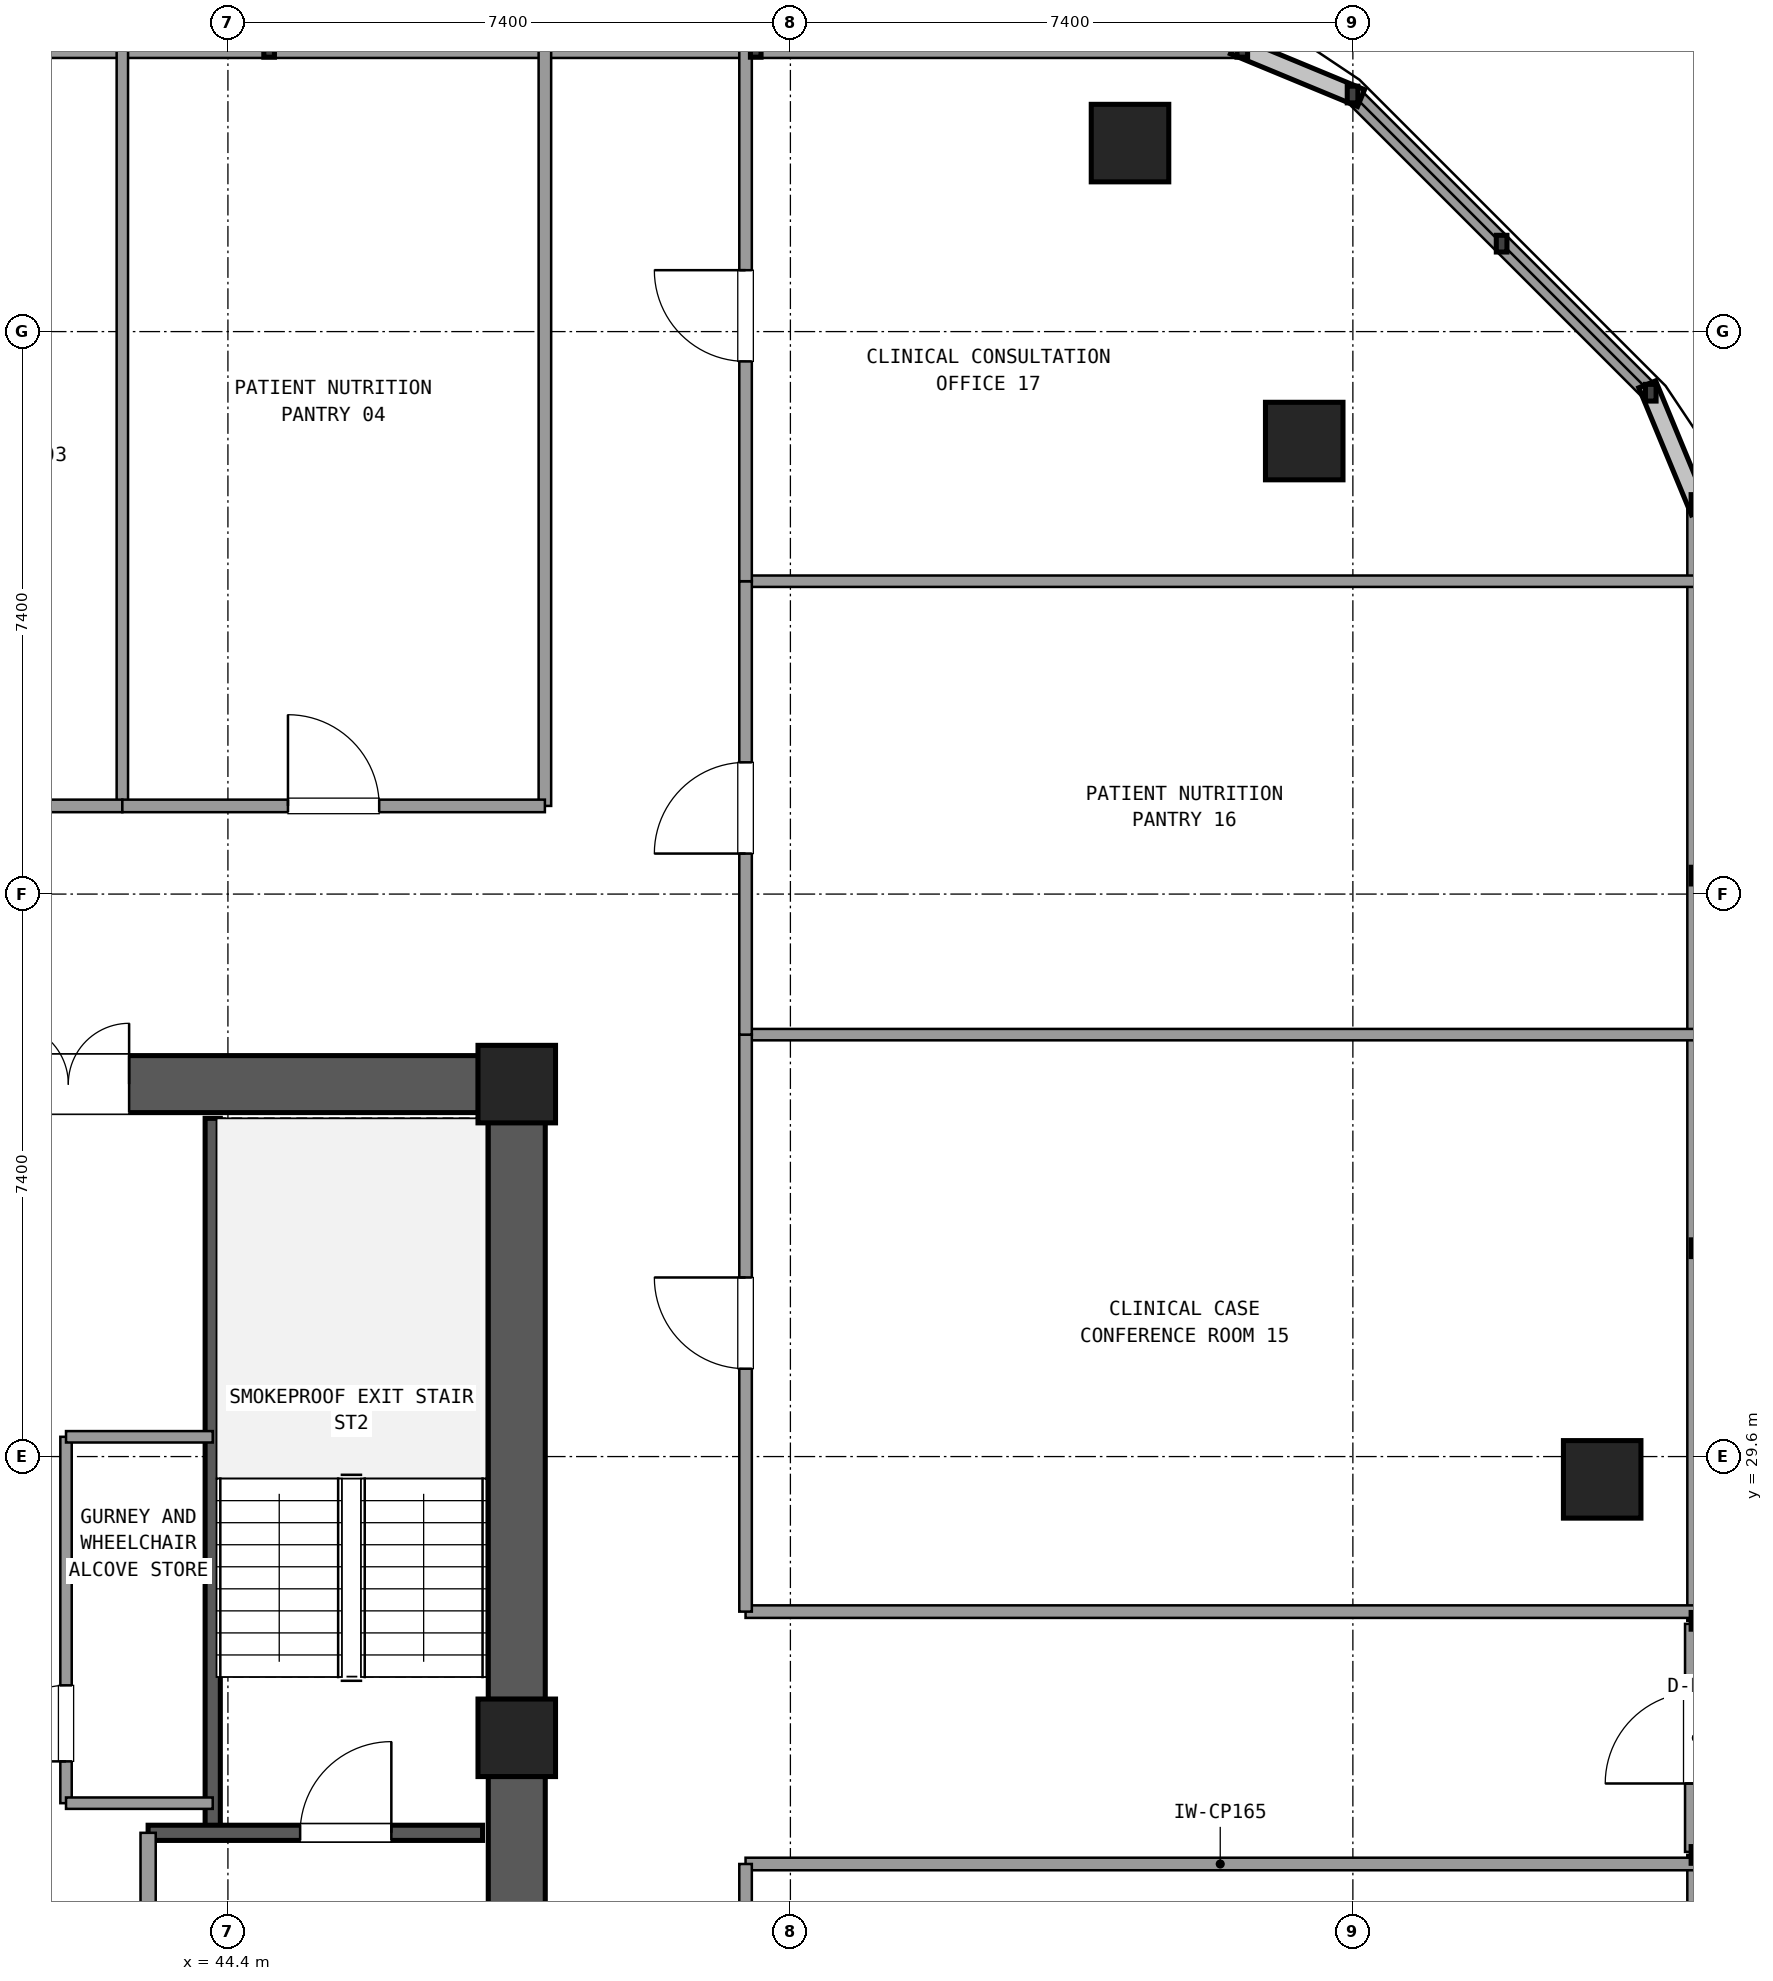
"""IFC4 building model, lengths in metres.
Left out: names, types, materials, properties, quantities, classifications, styles, units other than length and angle.
Written with IfcOpenShell. Run it as: python <this file> out.ifc"""

import sys

from ifc_helpers import new_model, si_unit, direction, frame, frame_2d, origin, origin_2d, place, context, subcontext, project, spatial, rectangle, extrude, element, fill, save


model = new_model("IFC4")
c1 = context("Model", 3, precision=1e-05, world=origin(), true_north=direction((0.0, 1.0)))
c2 = subcontext(c1, "Body", "Model", "MODEL_VIEW")
j1 = project(units=[si_unit("LENGTHUNIT", "METRE"), si_unit("PLANEANGLEUNIT", "RADIAN")], contexts=[c1])
p1 = place(None, origin())
s1 = spatial("IfcSite", under=j1, at=p1, CompositionType="ELEMENT")
p2 = place(p1, origin())
s2 = spatial("IfcBuilding", under=s1, at=p2, CompositionType="ELEMENT")
p3 = place(p2, frame((0.0, 0.0, 81.18)))
s3 = spatial("IfcBuildingStorey", under=s2, at=p3, CompositionType="ELEMENT", Elevation=81.18)
for number, where, z_axis, x_axis in (
    (1, (48.2, 25.9, 0.0), (0.0, 0.0, 1.0), (1.0, 0.0, 0.0)),
    (2, (48.2, 34.5, 0.0), (0.0, 0.0, 1.0), (1.0, 0.0, 0.0)),
):
    element("IfcColumn", number, at=place(p3, frame(where, z_axis=z_axis, x_axis=x_axis)), inside=s3, PredefinedType="COLUMN", context=c2, shape_type="SweptSolid", body=[
        extrude(rectangle(XDim=1.02, YDim=1.02, at=origin_2d()), origin(), (0.0, 0.0, 1.0), 3.6),
    ])
p4 = place(p3, frame((48.2, 17.805, 0.0), z_axis=(0.0, 0.0, 1.0), x_axis=(0.0, 1.0, 0.0)))
e3 = element("IfcWall", 3, at=p4, inside=s3, PredefinedType="SHEAR", context=c2, shape_type="SweptSolid", body=[
    extrude(rectangle(XDim=7.59, YDim=0.75, at=frame_2d((3.795, 0.0))), origin(), (0.0, 0.0, 1.0), 3.32),
])
p5 = place(p4, frame((4.245, 0.0, 0.0)))
e4 = element("IfcOpeningElement", 4, at=p5, cuts=e3, PredefinedType="OPENING", context=c2, shape_type="SweptSolid", body=[
    extrude(rectangle(XDim=1.2, YDim=2.15, at=frame_2d((0.6, 1.075))), frame((0.0, 0.385, 0.0), z_axis=(0.0, -1.0, 0.0), x_axis=(1.0, 0.0, 0.0)), (0.0, 0.0, 1.0), 0.77),
])
p6 = place(p3, frame((48.2, 26.405, 0.0), z_axis=(0.0, 0.0, 1.0), x_axis=(0.0, 1.0, 0.0)))
e5 = element("IfcWall", 5, at=p6, inside=s3, PredefinedType="SHEAR", context=c2, shape_type="SweptSolid", body=[
    extrude(rectangle(XDim=7.59, YDim=0.75, at=frame_2d((3.795, 0.0))), origin(), (0.0, 0.0, 1.0), 3.32),
])
p7 = place(p3, frame((47.695, 34.5, 0.0), z_axis=(0.0, 0.0, 1.0), x_axis=(-1.0, 0.0, 0.0)))
e6 = element("IfcWall", 6, at=p7, inside=s3, PredefinedType="SHEAR", context=c2, shape_type="SweptSolid", body=[
    extrude(rectangle(XDim=10.19, YDim=0.75, at=frame_2d((5.095, 0.0))), origin(), (0.0, 0.0, 1.0), 3.32),
])
p8 = place(p7, frame((4.595, 0.0, 0.0)))
e7 = element("IfcOpeningElement", 7, at=p8, cuts=e6, PredefinedType="OPENING", context=c2, shape_type="SweptSolid", body=[
    extrude(rectangle(XDim=1.6, YDim=2.2, at=frame_2d((0.8, 1.1))), frame((0.0, 0.385, 0.0), z_axis=(0.0, -1.0, 0.0), x_axis=(1.0, 0.0, 0.0)), (0.0, 0.0, 1.0), 0.77),
])
for number, where, z_axis, x_axis in (
    (8, (62.48, 29.3, 0.0), (0.0, 0.0, 1.0), (1.0, 0.0, 0.0)),
    (9, (58.56, 42.96, 0.0), (0.0, 0.0, 1.0), (1.0, 0.0, 0.0)),
    (10, (56.268, 46.88, 0.0), (0.0, 0.0, 1.0), (1.0, 0.0, 0.0)),
):
    element("IfcColumn", number, at=place(p3, frame(where, z_axis=z_axis, x_axis=x_axis)), inside=s3, PredefinedType="COLUMN", context=c2, shape_type="SweptSolid", body=[
        extrude(rectangle(XDim=1.02, YDim=1.02, at=origin_2d()), origin(), (0.0, 0.0, 1.0), 3.6),
    ])
p9 = place(p3, frame((63.72, 24.399, 0.0), z_axis=(0.0, 0.0, 1.0), x_axis=(0.0, 1.0, 0.0)))
e11 = element("IfcWall", 11, at=p9, inside=s3, PredefinedType="SOLIDWALL", context=c2, shape_type="SweptSolid", body=[
    extrude(rectangle(XDim=3.0, YDim=0.3, at=frame_2d((1.5, 0.0))), origin(), (0.0, 0.0, 1.0), 2.67),
])
p10 = place(p9, frame((0.9, 0.0, 0.0)))
e12 = element("IfcOpeningElement", 12, at=p10, cuts=e11, PredefinedType="OPENING", context=c2, shape_type="SweptSolid", body=[
    extrude(rectangle(XDim=1.2, YDim=2.2, at=frame_2d((0.6, 1.1))), frame((0.0, 0.16, 0.0), z_axis=(0.0, -1.0, 0.0), x_axis=(1.0, 0.0, 0.0)), (0.0, 0.0, 1.0), 0.32),
])
p11 = place(p3, frame((63.72, 9.655, 0.0), z_axis=(0.0, 0.0, 1.0), x_axis=(0.0, 1.0, 0.0)))
e13 = element("IfcWall", 13, at=p11, inside=s3, PredefinedType="SOLIDWALL", context=c2, shape_type="SweptSolid", body=[
    extrude(rectangle(XDim=14.704, YDim=0.24, at=frame_2d((7.352, 0.0))), origin(), (0.0, 0.0, 1.0), 0.85),
])
p12 = place(p3, frame((63.72, 27.439, 0.0), z_axis=(0.0, 0.0, 1.0), x_axis=(0.0, 1.0, 0.0)))
e14 = element("IfcWall", 14, at=p12, inside=s3, PredefinedType="SOLIDWALL", context=c2, shape_type="SweptSolid", body=[
    extrude(rectangle(XDim=14.706, YDim=0.24, at=frame_2d((7.353, 0.0))), origin(), (0.0, 0.0, 1.0), 0.85),
])
p13 = place(p3, frame((63.119, 43.596, 0.0), z_axis=(0.0, 0.0, 1.0), x_axis=(-0.707084777957, 0.707128783731, 0.0)))
e15 = element("IfcWall", 15, at=p13, inside=s3, PredefinedType="SOLIDWALL", context=c2, shape_type="SweptSolid", body=[
    extrude(rectangle(XDim=5.548, YDim=0.24, at=frame_2d((2.774, 0.0))), origin(), (0.0, 0.0, 1.0), 0.85),
])
p14 = place(p3, frame((57.745, 48.12, 0.0), z_axis=(0.0, 0.0, 1.0), x_axis=(-1.0, 0.0, 0.0)))
e16 = element("IfcWall", 16, at=p14, inside=s3, PredefinedType="SOLIDWALL", context=c2, shape_type="SweptSolid", body=[
    extrude(rectangle(XDim=19.204, YDim=0.24, at=frame_2d((9.602, 0.0))), origin(), (0.0, 0.0, 1.0), 0.85),
])
p15 = place(p3, frame((44.2, 24.65, 0.0), z_axis=(0.0, 0.0, 1.0), x_axis=(0.0, 1.0, 0.0)))
e17 = element("IfcWall", 17, at=p15, inside=s3, PredefinedType="SHEAR", context=c2, shape_type="SweptSolid", body=[
    extrude(rectangle(XDim=9.4, YDim=0.2, at=frame_2d((4.7, 0.0))), origin(), (0.0, 0.0, 1.0), 3.32),
])
p16 = place(p3, frame((43.35, 24.65, 0.0), z_axis=(0.0, 0.0, 1.0), x_axis=(1.0, 0.0, 0.0)))
e18 = element("IfcWall", 18, at=p16, inside=s3, PredefinedType="SHEAR", context=c2, shape_type="SweptSolid", body=[
    extrude(rectangle(XDim=4.4, YDim=0.2, at=frame_2d((2.2, 0.0))), origin(), (0.0, 0.0, 1.0), 3.32),
])
p17 = place(p16, frame((2.0, 0.0, 0.0)))
e19 = element("IfcOpeningElement", 19, at=p17, cuts=e18, PredefinedType="OPENING", context=c2, shape_type="SweptSolid", body=[
    extrude(rectangle(XDim=1.2, YDim=2.15, at=frame_2d((0.6, 1.075))), frame((0.0, 0.11, 0.0), z_axis=(0.0, -1.0, 0.0), x_axis=(1.0, 0.0, 0.0)), (0.0, 0.0, 1.0), 0.22),
])
p18 = place(p3, frame((43.35, 17.75, 0.0), z_axis=(0.0, 0.0, 1.0), x_axis=(0.0, 1.0, 0.0)))
e20 = element("IfcWall", 20, at=p18, inside=s3, PredefinedType="SOLIDWALL", context=c2, shape_type="SweptSolid", body=[
    extrude(rectangle(XDim=6.9, YDim=0.2, at=frame_2d((3.45, 0.0))), origin(), (0.0, 0.0, 1.0), 2.61),
])
p19 = place(p18, frame((4.15, 0.0, 0.0)))
e21 = element("IfcOpeningElement", 21, at=p19, cuts=e20, PredefinedType="OPENING", context=c2, shape_type="SweptSolid", body=[
    extrude(rectangle(XDim=1.2, YDim=2.15, at=frame_2d((0.6, 1.075))), frame((0.0, 0.11, 0.0), z_axis=(0.0, -1.0, 0.0), x_axis=(1.0, 0.0, 0.0)), (0.0, 0.0, 1.0), 0.22),
])
p20 = place(p3, frame((42.27, 25.04, 0.0), z_axis=(0.0, 0.0, 1.0), x_axis=(0.0, 1.0, 0.0)))
e22 = element("IfcWall", 22, at=p20, inside=s3, PredefinedType="PARTITIONING", context=c2, shape_type="SweptSolid", body=[
    extrude(rectangle(XDim=4.82, YDim=0.15, at=frame_2d((2.41, 0.0))), origin(), (0.0, 0.0, 1.0), 2.61),
])
p21 = place(p20, frame((0.55, 0.0, 0.0)))
e23 = element("IfcOpeningElement", 23, at=p21, cuts=e22, PredefinedType="OPENING", context=c2, shape_type="SweptSolid", body=[
    extrude(rectangle(XDim=1.0, YDim=2.15, at=frame_2d((0.5, 1.075))), frame((0.0, 0.085, 0.0), z_axis=(0.0, -1.0, 0.0), x_axis=(1.0, 0.0, 0.0)), (0.0, 0.0, 1.0), 0.17),
])
for number, where, z_axis, x_axis in (
    (24, (42.27, 25.04, 0.0), (0.0, 0.0, 1.0), (1.0, 0.0, 0.0)),
    (25, (42.27, 29.86, 0.0), (0.0, 0.0, 1.0), (1.0, 0.0, 0.0)),
):
    element("IfcWall", number, at=place(p3, frame(where, z_axis=z_axis, x_axis=x_axis)), inside=s3, PredefinedType="PARTITIONING", context=c2, shape_type="SweptSolid", body=[
        extrude(rectangle(XDim=1.93, YDim=0.15, at=frame_2d((0.965, 0.0))), origin(), (0.0, 0.0, 1.0), 2.61),
    ])
p22 = place(p3, frame((48.57, 38.16, 0.0), z_axis=(0.0, 0.0, 1.0), x_axis=(0.0, 1.0, 0.0)))
e26 = element("IfcWall", 26, at=p22, inside=s3, PredefinedType="PARTITIONING", context=c2, shape_type="SweptSolid", body=[
    extrude(rectangle(XDim=9.94, YDim=0.165, at=frame_2d((4.97, 0.0))), origin(), (0.0, 0.0, 1.0), 2.61),
])
for number, where, z_axis, x_axis in (
    (27, (51.21, 24.24, 0.0), (0.0, 0.0, 1.0), (1.0, 0.0, 0.0)),
    (28, (51.21, 27.56, 0.0), (0.0, 0.0, 1.0), (1.0, 0.0, 0.0)),
):
    element("IfcWall", number, at=place(p3, frame(where, z_axis=z_axis, x_axis=x_axis)), inside=s3, PredefinedType="PARTITIONING", context=c2, shape_type="SweptSolid", body=[
        extrude(rectangle(XDim=12.49, YDim=0.165, at=frame_2d((6.245, 0.0))), origin(), (0.0, 0.0, 1.0), 2.61),
    ])
p23 = place(p3, frame((43.011, 38.16, 0.0), z_axis=(0.0, 0.0, 1.0), x_axis=(0.0, 1.0, 0.0)))
e29 = element("IfcWall", 29, at=p23, inside=s3, PredefinedType="PARTITIONING", context=c2, shape_type="SweptSolid", body=[
    extrude(rectangle(XDim=9.94, YDim=0.15, at=frame_2d((4.97, 0.0))), origin(), (0.0, 0.0, 1.0), 2.61),
])
p24 = place(p3, frame((38.8, 38.16, 0.0), z_axis=(0.0, 0.0, 1.0), x_axis=(1.0, 0.0, 0.0)))
e30 = element("IfcWall", 30, at=p24, inside=s3, PredefinedType="PARTITIONING", context=c2, shape_type="SweptSolid", body=[
    extrude(rectangle(XDim=4.211, YDim=0.165, at=frame_2d((2.105, 0.0))), origin(), (0.0, 0.0, 1.0), 2.61),
])
p25 = place(p24, frame((1.506, 0.0, 0.0)))
e31 = element("IfcOpeningElement", 31, at=p25, cuts=e30, PredefinedType="OPENING", context=c2, shape_type="SweptSolid", body=[
    extrude(rectangle(XDim=1.2, YDim=2.15, at=frame_2d((0.6, 1.075))), frame((0.0, 0.093, 0.0), z_axis=(0.0, -1.0, 0.0), x_axis=(1.0, 0.0, 0.0)), (0.0, 0.0, 1.0), 0.185),
])
p26 = place(p3, frame((43.011, 38.16, 0.0), z_axis=(0.0, 0.0, 1.0), x_axis=(1.0, 0.0, 0.0)))
e32 = element("IfcWall", 32, at=p26, inside=s3, PredefinedType="PARTITIONING", context=c2, shape_type="SweptSolid", body=[
    extrude(rectangle(XDim=5.559, YDim=0.165, at=frame_2d((2.78, 0.0))), origin(), (0.0, 0.0, 1.0), 2.61),
])
p27 = place(p26, frame((2.179, 0.0, 0.0)))
e33 = element("IfcOpeningElement", 33, at=p27, cuts=e32, PredefinedType="OPENING", context=c2, shape_type="SweptSolid", body=[
    extrude(rectangle(XDim=1.2, YDim=2.15, at=frame_2d((0.6, 1.075))), frame((0.0, 0.093, 0.0), z_axis=(0.0, -1.0, 0.0), x_axis=(1.0, 0.0, 0.0)), (0.0, 0.0, 1.0), 0.185),
])
p28 = place(p3, frame((51.21, 15.613, 0.0), z_axis=(0.0, 0.0, 1.0), x_axis=(0.0, 1.0, 0.0)))
e34 = element("IfcWall", 34, at=p28, inside=s3, PredefinedType="PARTITIONING", context=c2, shape_type="SweptSolid", body=[
    extrude(rectangle(XDim=8.627, YDim=0.165, at=frame_2d((4.313, 0.0))), origin(), (0.0, 0.0, 1.0), 2.61),
])
p29 = place(p28, frame((3.713, 0.0, 0.0)))
e35 = element("IfcOpeningElement", 35, at=p29, cuts=e34, PredefinedType="OPENING", context=c2, shape_type="SweptSolid", body=[
    extrude(rectangle(XDim=1.2, YDim=2.15, at=frame_2d((0.6, 1.075))), frame((0.0, 0.093, 0.0), z_axis=(0.0, -1.0, 0.0), x_axis=(1.0, 0.0, 0.0)), (0.0, 0.0, 1.0), 0.185),
])
p30 = place(p3, frame((51.21, 35.151, 0.0), z_axis=(0.0, 0.0, 1.0), x_axis=(1.0, 0.0, 0.0)))
e36 = element("IfcWall", 36, at=p30, inside=s3, PredefinedType="PARTITIONING", context=c2, shape_type="SweptSolid", body=[
    extrude(rectangle(XDim=12.49, YDim=0.15, at=frame_2d((6.245, 0.0))), origin(), (0.0, 0.0, 1.0), 2.61),
])
p31 = place(p3, frame((51.21, 27.56, 0.0), z_axis=(0.0, 0.0, 1.0), x_axis=(0.0, 1.0, 0.0)))
e37 = element("IfcWall", 37, at=p31, inside=s3, PredefinedType="PARTITIONING", context=c2, shape_type="SweptSolid", body=[
    extrude(rectangle(XDim=7.591, YDim=0.165, at=frame_2d((3.795, 0.0))), origin(), (0.0, 0.0, 1.0), 2.61),
])
p32 = place(p31, frame((3.196, 0.0, 0.0)))
e38 = element("IfcOpeningElement", 38, at=p32, cuts=e37, PredefinedType="OPENING", context=c2, shape_type="SweptSolid", body=[
    extrude(rectangle(XDim=1.2, YDim=2.15, at=frame_2d((0.6, 1.075))), frame((0.0, 0.093, 0.0), z_axis=(0.0, -1.0, 0.0), x_axis=(1.0, 0.0, 0.0)), (0.0, 0.0, 1.0), 0.185),
])
p33 = place(p3, frame((51.21, 41.116, 0.0), z_axis=(0.0, 0.0, 1.0), x_axis=(1.0, 0.0, 0.0)))
e39 = element("IfcWall", 39, at=p33, inside=s3, PredefinedType="PARTITIONING", context=c2, shape_type="SweptSolid", body=[
    extrude(rectangle(XDim=12.49, YDim=0.15, at=frame_2d((6.245, 0.0))), origin(), (0.0, 0.0, 1.0), 2.61),
])
p34 = place(p3, frame((51.21, 35.151, 0.0), z_axis=(0.0, 0.0, 1.0), x_axis=(0.0, 1.0, 0.0)))
e40 = element("IfcWall", 40, at=p34, inside=s3, PredefinedType="PARTITIONING", context=c2, shape_type="SweptSolid", body=[
    extrude(rectangle(XDim=5.965, YDim=0.165, at=frame_2d((2.982, 0.0))), origin(), (0.0, 0.0, 1.0), 2.61),
])
p35 = place(p34, frame((2.382, 0.0, 0.0)))
e41 = element("IfcOpeningElement", 41, at=p35, cuts=e40, PredefinedType="OPENING", context=c2, shape_type="SweptSolid", body=[
    extrude(rectangle(XDim=1.2, YDim=2.15, at=frame_2d((0.6, 1.075))), frame((0.0, 0.093, 0.0), z_axis=(0.0, -1.0, 0.0), x_axis=(1.0, 0.0, 0.0)), (0.0, 0.0, 1.0), 0.185),
])
p36 = place(p3, frame((51.21, 41.116, 0.0), z_axis=(0.0, 0.0, 1.0), x_axis=(0.0, 1.0, 0.0)))
e42 = element("IfcWall", 42, at=p36, inside=s3, PredefinedType="PARTITIONING", context=c2, shape_type="SweptSolid", body=[
    extrude(rectangle(XDim=6.984, YDim=0.165, at=frame_2d((3.492, 0.0))), origin(), (0.0, 0.0, 1.0), 2.61),
])
p37 = place(p36, frame((2.892, 0.0, 0.0)))
e43 = element("IfcOpeningElement", 43, at=p37, cuts=e42, PredefinedType="OPENING", context=c2, shape_type="SweptSolid", body=[
    extrude(rectangle(XDim=1.2, YDim=2.15, at=frame_2d((0.6, 1.075))), frame((0.0, 0.093, 0.0), z_axis=(0.0, -1.0, 0.0), x_axis=(1.0, 0.0, 0.0)), (0.0, 0.0, 1.0), 0.185),
])
p38 = place(p17, origin())
e44 = element("IfcDoor", 44, at=p38, inside=s3, OperationType="SINGLE_SWING_RIGHT", PredefinedType="DOOR", context=c2, shape_type="SweptSolid", body=[
    extrude(rectangle(XDim=1.2, YDim=2.15, at=frame_2d((0.6, 1.075))), frame((0.0, 0.025, 0.0), z_axis=(0.0, -1.0, 0.0), x_axis=(1.0, 0.0, 0.0)), (0.0, 0.0, 1.0), 0.05),
])
fill(e19, e44)
p39 = place(p8, frame((1.6, 0.0, 0.0), z_axis=(0.0, 0.0, 1.0), x_axis=(-1.0, 0.0, 0.0)))
e45 = element("IfcDoor", 45, at=p39, inside=s3, OperationType="DOUBLE_DOOR_SINGLE_SWING", PredefinedType="DOOR", context=c2, shape_type="SweptSolid", body=[
    extrude(rectangle(XDim=1.6, YDim=2.2, at=frame_2d((0.8, 1.1))), frame((0.0, 0.025, 0.0), z_axis=(0.0, -1.0, 0.0), x_axis=(1.0, 0.0, 0.0)), (0.0, 0.0, 1.0), 0.05),
])
fill(e7, e45)
p40 = place(p21, origin())
e46 = element("IfcDoor", 46, at=p40, inside=s3, OperationType="SINGLE_SWING_LEFT", PredefinedType="DOOR", context=c2, shape_type="SweptSolid", body=[
    extrude(rectangle(XDim=1.0, YDim=2.15, at=frame_2d((0.5, 1.075))), frame((0.0, 0.025, 0.0), z_axis=(0.0, -1.0, 0.0), x_axis=(1.0, 0.0, 0.0)), (0.0, 0.0, 1.0), 0.05),
])
fill(e23, e46)
p41 = place(p27, origin())
e47 = element("IfcDoor", 47, at=p41, inside=s3, OperationType="SINGLE_SWING_LEFT", PredefinedType="DOOR", context=c2, shape_type="SweptSolid", body=[
    extrude(rectangle(XDim=1.2, YDim=2.15, at=frame_2d((0.6, 1.075))), frame((0.0, 0.025, 0.0), z_axis=(0.0, -1.0, 0.0), x_axis=(1.0, 0.0, 0.0)), (0.0, 0.0, 1.0), 0.05),
])
fill(e33, e47)
p42 = place(p32, origin())
e48 = element("IfcDoor", 48, at=p42, inside=s3, OperationType="SINGLE_SWING_RIGHT", PredefinedType="DOOR", context=c2, shape_type="SweptSolid", body=[
    extrude(rectangle(XDim=1.2, YDim=2.15, at=frame_2d((0.6, 1.075))), frame((0.0, 0.025, 0.0), z_axis=(0.0, -1.0, 0.0), x_axis=(1.0, 0.0, 0.0)), (0.0, 0.0, 1.0), 0.05),
])
fill(e38, e48)
p43 = place(p35, origin())
e49 = element("IfcDoor", 49, at=p43, inside=s3, OperationType="SINGLE_SWING_LEFT", PredefinedType="DOOR", context=c2, shape_type="SweptSolid", body=[
    extrude(rectangle(XDim=1.2, YDim=2.15, at=frame_2d((0.6, 1.075))), frame((0.0, 0.025, 0.0), z_axis=(0.0, -1.0, 0.0), x_axis=(1.0, 0.0, 0.0)), (0.0, 0.0, 1.0), 0.05),
])
fill(e41, e49)
p44 = place(p37, origin())
e50 = element("IfcDoor", 50, at=p44, inside=s3, OperationType="SINGLE_SWING_RIGHT", PredefinedType="DOOR", context=c2, shape_type="SweptSolid", body=[
    extrude(rectangle(XDim=1.2, YDim=2.15, at=frame_2d((0.6, 1.075))), frame((0.0, 0.025, 0.0), z_axis=(0.0, -1.0, 0.0), x_axis=(1.0, 0.0, 0.0)), (0.0, 0.0, 1.0), 0.05),
])
fill(e43, e50)
save(model, sys.argv[1])
